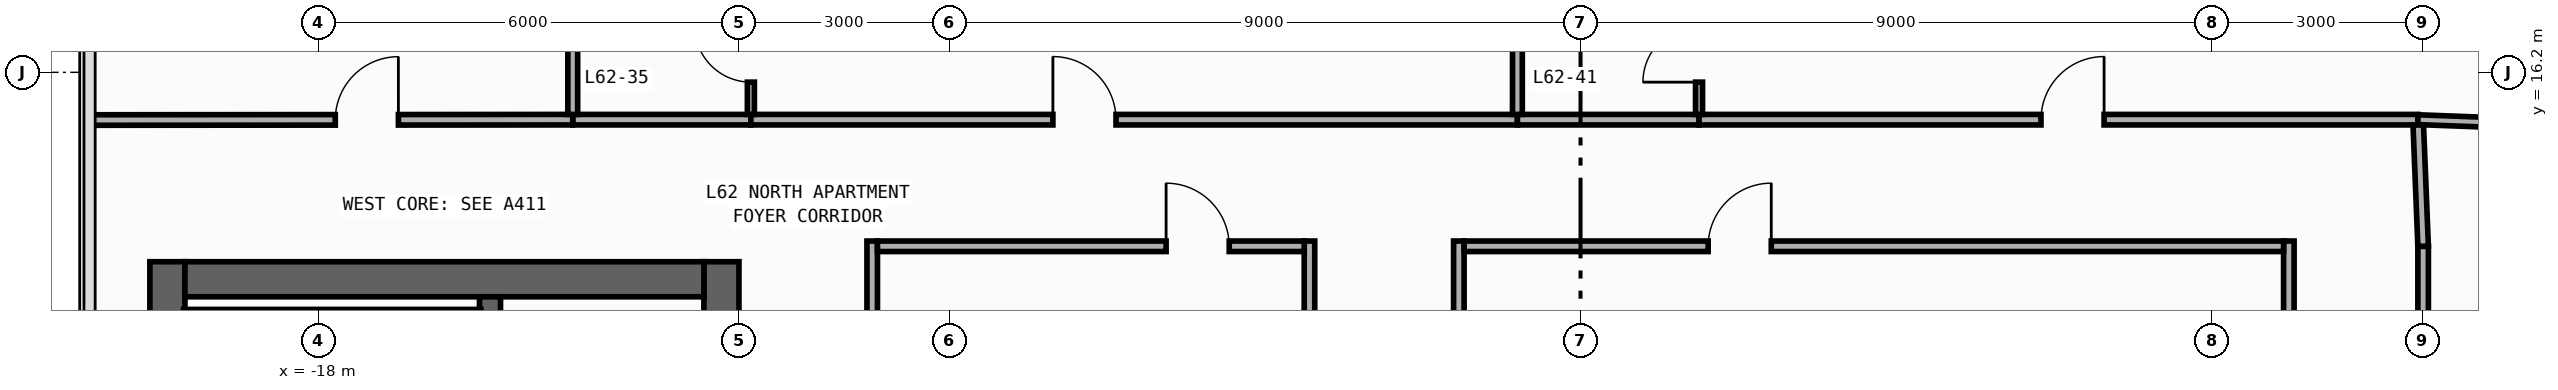
"""IFC4 building model, lengths in metres.
Left out: names, types, materials, properties, quantities, classifications, styles, units other than length and angle.
Written with IfcOpenShell. Run it as: python <this file> out.ifc"""

import sys

from ifc_helpers import new_model, si_unit, direction, frame, frame_2d, origin, place, context, subcontext, project, spatial, rectangle, extrude, element, fill, save


model = new_model("IFC4")
c1 = context("Model", 3, precision=1e-05, world=origin(), true_north=direction((0.0, 1.0)))
c2 = subcontext(c1, "Body", "Model", "MODEL_VIEW")
j1 = project(units=[si_unit("LENGTHUNIT", "METRE"), si_unit("PLANEANGLEUNIT", "RADIAN")], contexts=[c1])
p1 = place(None, origin())
s1 = spatial("IfcSite", under=j1, at=p1, CompositionType="ELEMENT")
p2 = place(p1, origin())
s2 = spatial("IfcBuilding", under=s1, at=p2, CompositionType="ELEMENT")
p3 = place(p2, frame((0.0, 0.0, 262.0)))
s3 = spatial("IfcBuildingStorey", under=s2, at=p3, CompositionType="ELEMENT", Elevation=262.0)
p4 = place(p3, frame((-20.15, -13.5, 0.0), z_axis=(0.0, 0.0, 1.0), x_axis=(0.0, 1.0, 0.0)))
e1 = element("IfcWall", 1, at=p4, inside=s3, PredefinedType="SHEAR", context=c2, shape_type="SweptSolid", body=[
    extrude(rectangle(XDim=27.0, YDim=0.5, at=frame_2d((13.5, 0.0))), origin(), (0.0, 0.0, 1.0), 3.34),
])
p5 = place(p3, frame((-12.25, -13.5, 0.0), z_axis=(0.0, 0.0, 1.0), x_axis=(0.0, 1.0, 0.0)))
e2 = element("IfcWall", 2, at=p5, inside=s3, PredefinedType="SHEAR", context=c2, shape_type="SweptSolid", body=[
    extrude(rectangle(XDim=27.0, YDim=0.5, at=frame_2d((13.5, 0.0))), origin(), (0.0, 0.0, 1.0), 3.34),
])
p6 = place(p5, frame((15.175, 0.0, 0.0)))
e3 = element("IfcOpeningElement", 3, at=p6, cuts=e2, PredefinedType="OPENING", context=c2, shape_type="SweptSolid", body=[
    extrude(rectangle(XDim=0.85, YDim=2.1, at=frame_2d((0.425, 1.05))), frame((0.0, 0.26, 0.0), z_axis=(0.0, -1.0, 0.0), x_axis=(1.0, 0.0, 0.0)), (0.0, 0.0, 1.0), 0.52),
])
p7 = place(p5, frame((21.275, 0.0, 0.0)))
e4 = element("IfcOpeningElement", 4, at=p7, cuts=e2, PredefinedType="OPENING", context=c2, shape_type="SweptSolid", body=[
    extrude(rectangle(XDim=0.85, YDim=2.1, at=frame_2d((0.425, 1.05))), frame((0.0, 0.26, 0.0), z_axis=(0.0, -1.0, 0.0), x_axis=(1.0, 0.0, 0.0)), (0.0, 0.0, 1.0), 0.52),
])
p8 = place(p5, frame((4.275, 0.0, 0.0)))
e5 = element("IfcOpeningElement", 5, at=p8, cuts=e2, PredefinedType="OPENING", context=c2, shape_type="SweptSolid", body=[
    extrude(rectangle(XDim=0.85, YDim=2.1, at=frame_2d((0.425, 1.05))), frame((0.0, 0.26, 0.0), z_axis=(0.0, -1.0, 0.0), x_axis=(1.0, 0.0, 0.0)), (0.0, 0.0, 1.0), 0.52),
])
p9 = place(p5, frame((10.275, 0.0, 0.0)))
e6 = element("IfcOpeningElement", 6, at=p9, cuts=e2, PredefinedType="OPENING", context=c2, shape_type="SweptSolid", body=[
    extrude(rectangle(XDim=0.85, YDim=2.1, at=frame_2d((0.425, 1.05))), frame((0.0, 0.26, 0.0), z_axis=(0.0, -1.0, 0.0), x_axis=(1.0, 0.0, 0.0)), (0.0, 0.0, 1.0), 0.52),
])
p10 = place(p5, frame((12.725, 0.0, 0.0)))
e7 = element("IfcOpeningElement", 7, at=p10, cuts=e2, PredefinedType="OPENING", context=c2, shape_type="SweptSolid", body=[
    extrude(rectangle(XDim=1.15, YDim=2.2, at=frame_2d((0.575, 1.1))), frame((0.0, 0.26, 0.0), z_axis=(0.0, -1.0, 0.0), x_axis=(1.0, 0.0, 0.0)), (0.0, 0.0, 1.0), 0.52),
])
p11 = place(p5, frame((1.625, 0.0, 0.0)))
e8 = element("IfcOpeningElement", 8, at=p11, cuts=e2, PredefinedType="OPENING", context=c2, shape_type="SweptSolid", body=[
    extrude(rectangle(XDim=0.85, YDim=2.1, at=frame_2d((0.425, 1.05))), frame((0.0, 0.26, 0.0), z_axis=(0.0, -1.0, 0.0), x_axis=(1.0, 0.0, 0.0)), (0.0, 0.0, 1.0), 0.52),
])
p12 = place(p3, frame((-19.9, 13.25, 0.0), z_axis=(0.0, 0.0, 1.0), x_axis=(1.0, 0.0, 0.0)))
e9 = element("IfcWall", 9, at=p12, inside=s3, PredefinedType="SHEAR", context=c2, shape_type="SweptSolid", body=[
    extrude(rectangle(XDim=7.4, YDim=0.5, at=frame_2d((3.7, 0.0))), origin(), (0.0, 0.0, 1.0), 3.34),
])
p13 = place(p3, frame((-15.55, -13.0, 0.0), z_axis=(0.0, 0.0, 1.0), x_axis=(0.0, 1.0, 0.0)))
e10 = element("IfcWall", 10, at=p13, inside=s3, PredefinedType="SHEAR", context=c2, shape_type="SweptSolid", body=[
    extrude(rectangle(XDim=26.0, YDim=0.3, at=frame_2d((13.0, 0.0))), origin(), (0.0, 0.0, 1.0), 3.34),
])
p14 = place(p13, frame((12.225, 0.0, 0.0)))
e11 = element("IfcOpeningElement", 11, at=p14, cuts=e10, PredefinedType="OPENING", context=c2, shape_type="SweptSolid", body=[
    extrude(rectangle(XDim=1.15, YDim=2.2, at=frame_2d((0.575, 1.1))), frame((0.0, 0.16, 0.0), z_axis=(0.0, -1.0, 0.0), x_axis=(1.0, 0.0, 0.0)), (0.0, 0.0, 1.0), 0.32),
])
p15 = place(p13, frame((1.125, 0.0, 0.0)))
e12 = element("IfcOpeningElement", 12, at=p15, cuts=e10, PredefinedType="OPENING", context=c2, shape_type="SweptSolid", body=[
    extrude(rectangle(XDim=0.85, YDim=2.1, at=frame_2d((0.425, 1.05))), frame((0.0, 0.16, 0.0), z_axis=(0.0, -1.0, 0.0), x_axis=(1.0, 0.0, 0.0)), (0.0, 0.0, 1.0), 0.32),
])
p16 = place(p3, frame((-19.92, 12.71, 0.0), z_axis=(0.0, 0.0, 1.0), x_axis=(1.0, 0.0, 0.0)))
e13 = element("IfcWall", 13, at=p16, inside=s3, PredefinedType="SHEAR", context=c2, shape_type="SweptSolid", body=[
    extrude(rectangle(XDim=4.24, YDim=0.22, at=frame_2d((2.12, 0.0))), origin(), (0.0, 0.0, 1.0), 3.34),
])
p17 = place(p3, frame((-10.1, -1.61, 0.0), z_axis=(0.0, 0.0, 1.0), x_axis=(0.0, 1.0, 0.0)))
e14 = element("IfcWall", 14, at=p17, inside=s3, PredefinedType="PARTITIONING", context=c2, shape_type="SweptSolid", body=[
    extrude(rectangle(XDim=15.405, YDim=0.15, at=frame_2d((7.703, 0.0))), origin(), (0.0, 0.0, 1.0), 3.34),
])
p18 = place(p17, frame((6.543, 0.0, 0.0)))
e15 = element("IfcOpeningElement", 15, at=p18, cuts=e14, PredefinedType="OPENING", context=c2, shape_type="SweptSolid", body=[
    extrude(rectangle(XDim=0.9, YDim=2.15, at=frame_2d((0.45, 1.075))), frame((0.0, 0.085, 0.0), z_axis=(0.0, -1.0, 0.0), x_axis=(1.0, 0.0, 0.0)), (0.0, 0.0, 1.0), 0.17),
])
p19 = place(p3, frame((12.015, 7.2, 0.0), z_axis=(0.0, 0.0, 1.0), x_axis=(0.0, 1.0, 0.0)))
e16 = element("IfcWall", 16, at=p19, inside=s3, PredefinedType="PARTITIONING", context=c2, shape_type="SweptSolid", body=[
    extrude(rectangle(XDim=6.52, YDim=0.15, at=frame_2d((3.26, 0.0))), origin(), (0.0, 0.0, 1.0), 3.34),
])
p20 = place(p19, frame((0.67, 0.0, 0.0)))
e17 = element("IfcOpeningElement", 17, at=p20, cuts=e16, PredefinedType="OPENING", context=c2, shape_type="SweptSolid", body=[
    extrude(rectangle(XDim=0.9, YDim=2.15, at=frame_2d((0.45, 1.075))), frame((0.0, 0.085, 0.0), z_axis=(0.0, -1.0, 0.0), x_axis=(1.0, 0.0, 0.0)), (0.0, 0.0, 1.0), 0.17),
])
p21 = place(p3, frame((10.1, -1.61, 0.0), z_axis=(0.0, 0.0, 1.0), x_axis=(0.0, 1.0, 0.0)))
e18 = element("IfcWall", 18, at=p21, inside=s3, PredefinedType="PARTITIONING", context=c2, shape_type="SweptSolid", body=[
    extrude(rectangle(XDim=15.405, YDim=0.15, at=frame_2d((7.703, 0.0))), origin(), (0.0, 0.0, 1.0), 3.34),
])
p22 = place(p21, frame((6.543, 0.0, 0.0)))
e19 = element("IfcOpeningElement", 19, at=p22, cuts=e18, PredefinedType="OPENING", context=c2, shape_type="SweptSolid", body=[
    extrude(rectangle(XDim=0.9, YDim=2.15, at=frame_2d((0.45, 1.075))), frame((0.0, 0.085, 0.0), z_axis=(0.0, -1.0, 0.0), x_axis=(1.0, 0.0, 0.0)), (0.0, 0.0, 1.0), 0.17),
])
p23 = place(p3, frame((-3.865, -1.46, 0.0), z_axis=(0.0, 0.0, 1.0), x_axis=(0.0, 1.0, 0.0)))
e20 = element("IfcWall", 20, at=p23, inside=s3, PredefinedType="PARTITIONING", context=c2, shape_type="SweptSolid", body=[
    extrude(rectangle(XDim=15.255, YDim=0.15, at=frame_2d((7.627, 0.0))), origin(), (0.0, 0.0, 1.0), 3.34),
])
p24 = place(p23, frame((6.476, 0.0, 0.0)))
e21 = element("IfcOpeningElement", 21, at=p24, cuts=e20, PredefinedType="OPENING", context=c2, shape_type="SweptSolid", body=[
    extrude(rectangle(XDim=0.9, YDim=2.15, at=frame_2d((0.45, 1.075))), frame((0.0, 0.085, 0.0), z_axis=(0.0, -1.0, 0.0), x_axis=(1.0, 0.0, 0.0)), (0.0, 0.0, 1.0), 0.17),
])
p25 = place(p3, frame((-1.735, -1.46, 0.0), z_axis=(0.0, 0.0, 1.0), x_axis=(0.0, 1.0, 0.0)))
e22 = element("IfcWall", 22, at=p25, inside=s3, PredefinedType="PARTITIONING", context=c2, shape_type="SweptSolid", body=[
    extrude(rectangle(XDim=15.255, YDim=0.15, at=frame_2d((7.627, 0.0))), origin(), (0.0, 0.0, 1.0), 3.34),
])
p26 = place(p25, frame((6.476, 0.0, 0.0)))
e23 = element("IfcOpeningElement", 23, at=p26, cuts=e22, PredefinedType="OPENING", context=c2, shape_type="SweptSolid", body=[
    extrude(rectangle(XDim=0.9, YDim=2.15, at=frame_2d((0.45, 1.075))), frame((0.0, 0.085, 0.0), z_axis=(0.0, -1.0, 0.0), x_axis=(1.0, 0.0, 0.0)), (0.0, 0.0, 1.0), 0.17),
])
p27 = place(p3, frame((-14.37, 15.525, 0.0), z_axis=(0.0, 0.0, 1.0), x_axis=(1.0, 0.0, 0.0)))
e24 = element("IfcWall", 24, at=p27, inside=s3, PredefinedType="PARTITIONING", context=c2, shape_type="SweptSolid", body=[
    extrude(rectangle(XDim=2.54, YDim=0.15, at=frame_2d((1.27, 0.0))), origin(), (0.0, 0.0, 1.0), 3.34),
])
p28 = place(p3, frame((-11.83, 15.525, 0.0), z_axis=(0.0, 0.0, 1.0), x_axis=(1.0, 0.0, 0.0)))
e25 = element("IfcWall", 25, at=p28, inside=s3, PredefinedType="PARTITIONING", context=c2, shape_type="SweptSolid", body=[
    extrude(rectangle(XDim=10.93, YDim=0.15, at=frame_2d((5.465, 0.0))), origin(), (0.0, 0.0, 1.0), 3.34),
])
p29 = place(p28, frame((4.306, 0.0, 0.0)))
e26 = element("IfcOpeningElement", 26, at=p29, cuts=e25, PredefinedType="OPENING", context=c2, shape_type="SweptSolid", body=[
    extrude(rectangle(XDim=0.9, YDim=2.15, at=frame_2d((0.45, 1.075))), frame((0.0, 0.085, 0.0), z_axis=(0.0, -1.0, 0.0), x_axis=(1.0, 0.0, 0.0)), (0.0, 0.0, 1.0), 0.17),
])
p30 = place(p3, frame((-0.9, 15.525, 0.0), z_axis=(0.0, 0.0, 1.0), x_axis=(1.0, 0.0, 0.0)))
e27 = element("IfcWall", 27, at=p30, inside=s3, PredefinedType="PARTITIONING", context=c2, shape_type="SweptSolid", body=[
    extrude(rectangle(XDim=2.59, YDim=0.15, at=frame_2d((1.295, 0.0))), origin(), (0.0, 0.0, 1.0), 3.34),
])
p31 = place(p3, frame((1.69, 15.525, 0.0), z_axis=(0.0, 0.0, 1.0), x_axis=(1.0, 0.0, 0.0)))
e28 = element("IfcWall", 28, at=p31, inside=s3, PredefinedType="PARTITIONING", context=c2, shape_type="SweptSolid", body=[
    extrude(rectangle(XDim=10.25, YDim=0.15, at=frame_2d((5.125, 0.0))), origin(), (0.0, 0.0, 1.0), 3.34),
])
p32 = place(p31, frame((4.876, 0.0, 0.0)))
e29 = element("IfcOpeningElement", 29, at=p32, cuts=e28, PredefinedType="OPENING", context=c2, shape_type="SweptSolid", body=[
    extrude(rectangle(XDim=0.9, YDim=2.15, at=frame_2d((0.45, 1.075))), frame((0.0, 0.085, 0.0), z_axis=(0.0, -1.0, 0.0), x_axis=(1.0, 0.0, 0.0)), (0.0, 0.0, 1.0), 0.17),
])
p33 = place(p3, frame((12.015, 13.72, 0.0), z_axis=(0.0, 0.0, 1.0), x_axis=(-0.040046877756, 0.99919780203, 0.0)))
e30 = element("IfcWall", 30, at=p33, inside=s3, PredefinedType="PARTITIONING", context=c2, shape_type="SweptSolid", body=[
    extrude(rectangle(XDim=1.731, YDim=0.15, at=frame_2d((0.866, 0.0))), origin(), (0.0, 0.0, 1.0), 3.34),
])
p34 = place(p3, frame((-21.255, 15.52, 0.0), z_axis=(0.0, 0.0, 1.0), x_axis=(0.999999748504, 0.00070921968, 0.0)))
e31 = element("IfcWall", 31, at=p34, inside=s3, PredefinedType="PARTITIONING", context=c2, shape_type="SweptSolid", body=[
    extrude(rectangle(XDim=6.885, YDim=0.15, at=frame_2d((3.442, 0.0))), origin(), (0.0, 0.0, 1.0), 3.34),
])
p35 = place(p34, frame((3.499, 0.0, 0.0)))
e32 = element("IfcOpeningElement", 32, at=p35, cuts=e31, PredefinedType="OPENING", context=c2, shape_type="SweptSolid", body=[
    extrude(rectangle(XDim=0.9, YDim=2.15, at=frame_2d((0.45, 1.075))), frame((0.0, 0.085, 0.0), z_axis=(0.0, -1.0, 0.0), x_axis=(1.0, 0.0, 0.0)), (0.0, 0.0, 1.0), 0.17),
])
p36 = place(p3, frame((-10.025, 13.72, 0.0), z_axis=(0.0, 0.0, 1.0), x_axis=(1.0, 0.0, 0.0)))
e33 = element("IfcWall", 33, at=p36, inside=s3, PredefinedType="PARTITIONING", context=c2, shape_type="SweptSolid", body=[
    extrude(rectangle(XDim=6.085, YDim=0.15, at=frame_2d((3.042, 0.0))), origin(), (0.0, 0.0, 1.0), 3.34),
])
p37 = place(p36, frame((4.116, 0.0, 0.0)))
e34 = element("IfcOpeningElement", 34, at=p37, cuts=e33, PredefinedType="OPENING", context=c2, shape_type="SweptSolid", body=[
    extrude(rectangle(XDim=0.9, YDim=2.15, at=frame_2d((0.45, 1.075))), frame((0.0, 0.085, 0.0), z_axis=(0.0, -1.0, 0.0), x_axis=(1.0, 0.0, 0.0)), (0.0, 0.0, 1.0), 0.17),
])
p38 = place(p3, frame((-1.66, 13.72, 0.0), z_axis=(0.0, 0.0, 1.0), x_axis=(1.0, 0.0, 0.0)))
e35 = element("IfcWall", 35, at=p38, inside=s3, PredefinedType="PARTITIONING", context=c2, shape_type="SweptSolid", body=[
    extrude(rectangle(XDim=11.685, YDim=0.15, at=frame_2d((5.842, 0.0))), origin(), (0.0, 0.0, 1.0), 3.34),
])
p39 = place(p38, frame((3.48, 0.0, 0.0)))
e36 = element("IfcOpeningElement", 36, at=p39, cuts=e35, PredefinedType="OPENING", context=c2, shape_type="SweptSolid", body=[
    extrude(rectangle(XDim=0.9, YDim=2.15, at=frame_2d((0.45, 1.075))), frame((0.0, 0.085, 0.0), z_axis=(0.0, -1.0, 0.0), x_axis=(1.0, 0.0, 0.0)), (0.0, 0.0, 1.0), 0.17),
])
p40 = place(p3, frame((-11.83, 15.6, 0.0), z_axis=(0.0, 0.0, 1.0), x_axis=(0.0, 1.0, 0.0)))
e37 = element("IfcWall", 37, at=p40, inside=s3, PredefinedType="PARTITIONING", context=c2, shape_type="SweptSolid", body=[
    extrude(rectangle(XDim=2.5, YDim=0.1, at=frame_2d((1.25, 0.0))), origin(), (0.0, 0.0, 1.0), 3.34),
])
p41 = place(p40, frame((0.46, 0.0, 0.0)))
e38 = element("IfcOpeningElement", 38, at=p41, cuts=e37, PredefinedType="OPENING", context=c2, shape_type="SweptSolid", body=[
    extrude(rectangle(XDim=0.8, YDim=2.1, at=frame_2d((0.4, 1.05))), frame((0.0, 0.06, 0.0), z_axis=(0.0, -1.0, 0.0), x_axis=(1.0, 0.0, 0.0)), (0.0, 0.0, 1.0), 0.12),
])
p42 = place(p3, frame((-14.37, 15.6, 0.0), z_axis=(0.0, 0.0, 1.0), x_axis=(0.0, 1.0, 0.0)))
e39 = element("IfcWall", 39, at=p42, inside=s3, PredefinedType="PARTITIONING", context=c2, shape_type="SweptSolid", body=[
    extrude(rectangle(XDim=2.5, YDim=0.14, at=frame_2d((1.25, 0.0))), origin(), (0.0, 0.0, 1.0), 2.44),
])
p43 = place(p3, frame((-0.9, 15.6, 0.0), z_axis=(0.0, 0.0, 1.0), x_axis=(0.0, 1.0, 0.0)))
e40 = element("IfcWall", 40, at=p43, inside=s3, PredefinedType="PARTITIONING", context=c2, shape_type="SweptSolid", body=[
    extrude(rectangle(XDim=2.5, YDim=0.14, at=frame_2d((1.25, 0.0))), origin(), (0.0, 0.0, 1.0), 3.34),
])
p44 = place(p3, frame((1.69, 15.6, 0.0), z_axis=(0.0, 0.0, 1.0), x_axis=(0.0, 1.0, 0.0)))
e41 = element("IfcWall", 41, at=p44, inside=s3, PredefinedType="PARTITIONING", context=c2, shape_type="SweptSolid", body=[
    extrude(rectangle(XDim=2.5, YDim=0.1, at=frame_2d((1.25, 0.0))), origin(), (0.0, 0.0, 1.0), 3.34),
])
p45 = place(p44, frame((0.46, 0.0, 0.0)))
e42 = element("IfcOpeningElement", 42, at=p45, cuts=e41, PredefinedType="OPENING", context=c2, shape_type="SweptSolid", body=[
    extrude(rectangle(XDim=0.8, YDim=2.1, at=frame_2d((0.4, 1.05))), frame((0.0, 0.06, 0.0), z_axis=(0.0, -1.0, 0.0), x_axis=(1.0, 0.0, 0.0)), (0.0, 0.0, 1.0), 0.12),
])
p46 = place(p3, frame((11.94, 15.525, 0.0), z_axis=(0.0, 0.0, 1.0), x_axis=(0.999304229002, -0.037296888581, 0.0)))
e43 = element("IfcWall", 43, at=p46, inside=s3, PredefinedType="PARTITIONING", context=c2, shape_type="SweptSolid", body=[
    extrude(rectangle(XDim=1.741, YDim=0.14, at=frame_2d((0.871, 0.0))), origin(), (0.0, 0.0, 1.0), 3.34),
])
p47 = place(p29, origin())
e44 = element("IfcDoor", 44, at=p47, inside=s3, OperationType="SINGLE_SWING_LEFT", PredefinedType="DOOR", context=c2, shape_type="SweptSolid", body=[
    extrude(rectangle(XDim=0.9, YDim=2.15, at=frame_2d((0.45, 1.075))), frame((0.0, 0.025, 0.0), z_axis=(0.0, -1.0, 0.0), x_axis=(1.0, 0.0, 0.0)), (0.0, 0.0, 1.0), 0.05),
])
fill(e26, e44)
p48 = place(p32, origin())
e45 = element("IfcDoor", 45, at=p48, inside=s3, OperationType="SINGLE_SWING_RIGHT", PredefinedType="DOOR", context=c2, shape_type="SweptSolid", body=[
    extrude(rectangle(XDim=0.9, YDim=2.15, at=frame_2d((0.45, 1.075))), frame((0.0, 0.025, 0.0), z_axis=(0.0, -1.0, 0.0), x_axis=(1.0, 0.0, 0.0)), (0.0, 0.0, 1.0), 0.05),
])
fill(e29, e45)
p49 = place(p35, origin())
e46 = element("IfcDoor", 46, at=p49, inside=s3, OperationType="SINGLE_SWING_RIGHT", PredefinedType="DOOR", context=c2, shape_type="SweptSolid", body=[
    extrude(rectangle(XDim=0.9, YDim=2.15, at=frame_2d((0.45, 1.075))), frame((0.0, 0.025, 0.0), z_axis=(0.0, -1.0, 0.0), x_axis=(1.0, 0.0, 0.0)), (0.0, 0.0, 1.0), 0.05),
])
fill(e32, e46)
p50 = place(p37, origin())
e47 = element("IfcDoor", 47, at=p50, inside=s3, OperationType="SINGLE_SWING_LEFT", PredefinedType="DOOR", context=c2, shape_type="SweptSolid", body=[
    extrude(rectangle(XDim=0.9, YDim=2.15, at=frame_2d((0.45, 1.075))), frame((0.0, 0.025, 0.0), z_axis=(0.0, -1.0, 0.0), x_axis=(1.0, 0.0, 0.0)), (0.0, 0.0, 1.0), 0.05),
])
fill(e34, e47)
p51 = place(p39, origin())
e48 = element("IfcDoor", 48, at=p51, inside=s3, OperationType="SINGLE_SWING_RIGHT", PredefinedType="DOOR", context=c2, shape_type="SweptSolid", body=[
    extrude(rectangle(XDim=0.9, YDim=2.15, at=frame_2d((0.45, 1.075))), frame((0.0, 0.025, 0.0), z_axis=(0.0, -1.0, 0.0), x_axis=(1.0, 0.0, 0.0)), (0.0, 0.0, 1.0), 0.05),
])
fill(e36, e48)
p52 = place(p41, origin())
e49 = element("IfcDoor", 49, at=p52, inside=s3, OperationType="SINGLE_SWING_RIGHT", PredefinedType="DOOR", context=c2, shape_type="SweptSolid", body=[
    extrude(rectangle(XDim=0.8, YDim=2.1, at=frame_2d((0.4, 1.05))), frame((0.0, 0.025, 0.0), z_axis=(0.0, -1.0, 0.0), x_axis=(1.0, 0.0, 0.0)), (0.0, 0.0, 1.0), 0.05),
])
fill(e38, e49)
p53 = place(p45, origin())
e50 = element("IfcDoor", 50, at=p53, inside=s3, OperationType="SINGLE_SWING_LEFT", PredefinedType="DOOR", context=c2, shape_type="SweptSolid", body=[
    extrude(rectangle(XDim=0.8, YDim=2.1, at=frame_2d((0.4, 1.05))), frame((0.0, 0.025, 0.0), z_axis=(0.0, -1.0, 0.0), x_axis=(1.0, 0.0, 0.0)), (0.0, 0.0, 1.0), 0.05),
])
fill(e42, e50)
save(model, sys.argv[1])
